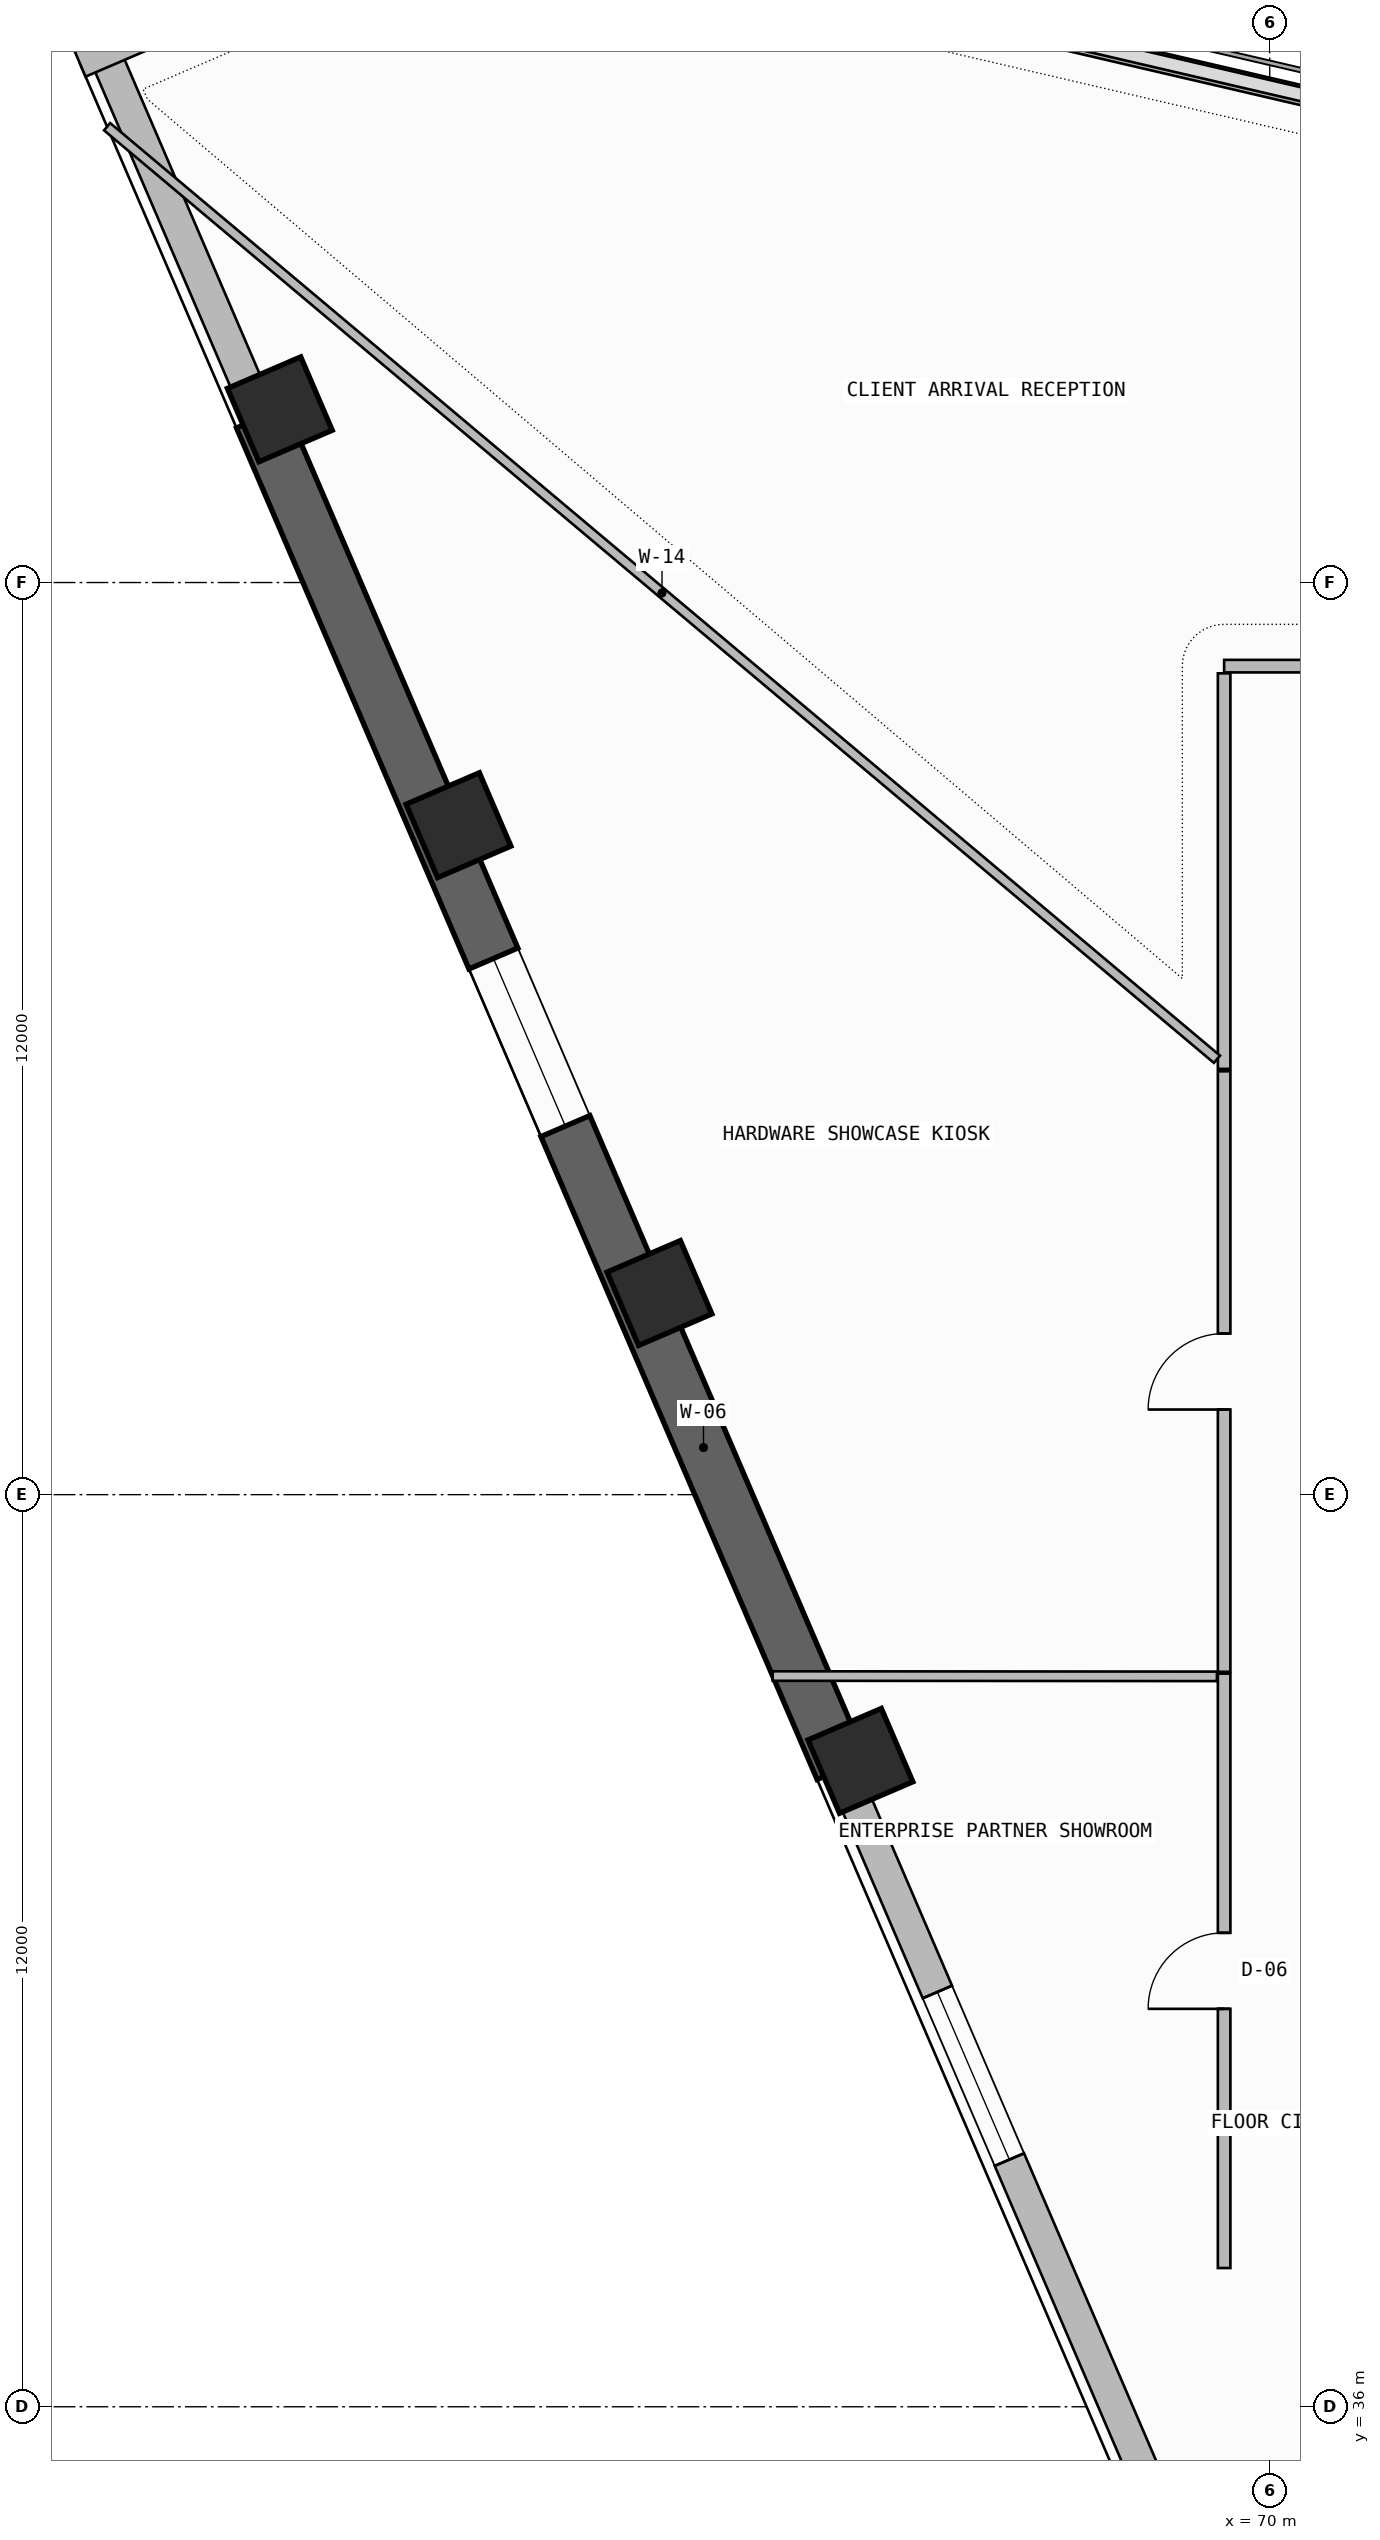
"""IFC4 building model, lengths in metres.
Left out: names, types, materials, properties, quantities, classifications, styles, units other than length and angle.
Written with IfcOpenShell. Run it as: python <this file> out.ifc"""

import sys

from ifc_helpers import new_model, si_unit, direction, frame, frame_2d, origin, origin_2d, place, context, subcontext, project, spatial, rectangle, extrude, element, fill, save


model = new_model("IFC4")
c1 = context("Model", 3, precision=1e-05, world=origin(), true_north=direction((0.0, 1.0)))
c2 = subcontext(c1, "Body", "Model", "MODEL_VIEW")
j1 = project(units=[si_unit("LENGTHUNIT", "METRE"), si_unit("PLANEANGLEUNIT", "RADIAN")], contexts=[c1])
p1 = place(None, origin())
s1 = spatial("IfcSite", under=j1, at=p1, CompositionType="ELEMENT")
p2 = place(p1, origin())
s2 = spatial("IfcBuilding", under=s1, at=p2, CompositionType="ELEMENT")
p3 = place(p2, frame((0.0, 0.0, 182.62)))
s3 = spatial("IfcBuildingStorey", under=s2, at=p3, CompositionType="ELEMENT", Elevation=182.62)
for number, where, z_axis, x_axis in (
    (1, (56.976, 62.279, 0.0), (0.0, 0.0, 1.0), (-0.395, 0.919, 0.0)),
    (2, (59.326, 56.807, 0.0), (0.0, 0.0, 1.0), (-0.395, 0.919, 0.0)),
    (3, (61.97, 50.653, 0.0), (0.0, 0.0, 1.0), (-0.395, 0.919, 0.0)),
    (4, (64.615, 44.498, 0.0), (0.0, 0.0, 1.0), (-0.395, 0.919, 0.0)),
):
    element("IfcColumn", number, at=place(p3, frame(where, z_axis=z_axis, x_axis=x_axis)), inside=s3, PredefinedType="COLUMN", context=c2, shape_type="SweptSolid", body=[
        extrude(rectangle(XDim=1.05, YDim=1.05, at=origin_2d()), origin(), (0.0, 0.0, 1.0), 3.52),
    ])
p4 = place(p3, frame((54.671, 66.959, 0.0), z_axis=(0.0, 0.0, 1.0), x_axis=(0.394733507229, -0.918795656428, 0.0)))
e5 = element("IfcWall", 5, at=p4, inside=s3, PredefinedType="SOLIDWALL", context=c2, shape_type="SweptSolid", body=[
    extrude(rectangle(XDim=5.21, YDim=0.42, at=frame_2d((2.605, 0.0))), origin(), (0.0, 0.0, 1.0), 2.645),
])
p5 = place(p3, frame((56.728, 62.172, -0.26), z_axis=(0.0, 0.0, 1.0), x_axis=(0.394736752992, -0.918794261974, 0.0)))
e6 = element("IfcWall", 6, at=p5, inside=s3, PredefinedType="SHEAR", context=c2, shape_type="SweptSolid", body=[
    extrude(rectangle(XDim=19.353, YDim=0.7, at=frame_2d((9.676, 0.0))), origin(), (0.0, 0.0, 1.0), 3.52),
])
p6 = place(p5, frame((7.747, 0.0, 1.2)))
e7 = element("IfcOpeningElement", 7, at=p6, cuts=e6, PredefinedType="OPENING", context=c2, shape_type="SweptSolid", body=[
    extrude(rectangle(XDim=2.4, YDim=0.9, at=frame_2d((1.2, 0.45))), frame((0.0, 0.36, 0.0), z_axis=(0.0, -1.0, 0.0), x_axis=(1.0, 0.0, 0.0)), (0.0, 0.0, 1.0), 0.72),
])
p7 = place(p3, frame((64.367, 44.391, 0.0), z_axis=(0.0, 0.0, 1.0), x_axis=(0.394757430431, -0.918785378159, 0.0)))
e8 = element("IfcWall", 8, at=p7, inside=s3, PredefinedType="SOLIDWALL", context=c2, shape_type="SweptSolid", body=[
    extrude(rectangle(XDim=12.654, YDim=0.42, at=frame_2d((6.327, 0.0))), origin(), (0.0, 0.0, 1.0), 2.645),
])
p8 = place(p7, frame((3.193, 0.0, 1.2)))
e9 = element("IfcOpeningElement", 9, at=p8, cuts=e8, PredefinedType="OPENING", context=c2, shape_type="SweptSolid", body=[
    extrude(rectangle(XDim=2.4, YDim=0.9, at=frame_2d((1.2, 0.45))), frame((0.0, 0.22, 0.0), z_axis=(0.0, -1.0, 0.0), x_axis=(1.0, 0.0, 0.0)), (0.0, 0.0, 1.0), 0.44),
])
p9 = place(p3, frame((56.566, 67.773, 0.0), z_axis=(0.0, 0.0, 1.0), x_axis=(-0.918788830096, -0.394749396062, 0.0)))
e10 = element("IfcWall", 10, at=p9, inside=s3, PredefinedType="SOLIDWALL", context=c2, shape_type="SweptSolid", body=[
    extrude(rectangle(XDim=2.413, YDim=0.36, at=frame_2d((1.207, 0.0))), origin(), (0.0, 0.0, 1.0), 3.26),
])
p10 = place(p3, frame((87.165, 62.482, 0.0), z_axis=(0.0, 0.0, 1.0), x_axis=(-0.973958631559, 0.226725790352, 0.0)))
e11 = element("IfcWall", 11, at=p10, inside=s3, PredefinedType="PARAPET", context=c2, shape_type="SweptSolid", body=[
    extrude(rectangle(XDim=27.376, YDim=0.2, at=frame_2d((13.688, 0.0))), origin(), (0.0, 0.0, 1.0), 1.15),
])
p11 = place(p3, frame((69.4, 45.646, 0.0), z_axis=(0.0, 0.0, 1.0), x_axis=(0.0, -1.0, 0.0)))
e12 = element("IfcWall", 12, at=p11, inside=s3, PredefinedType="PARTITIONING", context=c2, shape_type="SweptSolid", body=[
    extrude(rectangle(XDim=7.82, YDim=0.165, at=frame_2d((3.91, 0.0))), origin(), (0.0, 0.0, 1.0), 3.26),
])
p12 = place(p11, frame((3.41, 0.0, 0.0)))
e13 = element("IfcOpeningElement", 13, at=p12, cuts=e12, PredefinedType="OPENING", context=c2, shape_type="SweptSolid", body=[
    extrude(rectangle(XDim=1.0, YDim=2.2, at=frame_2d((0.5, 1.1))), frame((0.0, 0.093, 0.0), z_axis=(0.0, -1.0, 0.0), x_axis=(1.0, 0.0, 0.0)), (0.0, 0.0, 1.0), 0.185),
])
p13 = place(p3, frame((63.46, 45.614, 0.0), z_axis=(0.0, 0.0, 1.0), x_axis=(0.999999747894, -0.000710078765, 0.0)))
e14 = element("IfcWall", 14, at=p13, inside=s3, PredefinedType="PARTITIONING", context=c2, shape_type="SweptSolid", body=[
    extrude(rectangle(XDim=5.845, YDim=0.125, at=frame_2d((2.922, 0.0))), origin(), (0.0, 0.0, 1.0), 2.645),
])
p14 = place(p3, frame((76.526, 58.9, 0.0), z_axis=(0.0, 0.0, 1.0), x_axis=(-1.0, 0.0, 0.0)))
e15 = element("IfcWall", 15, at=p14, inside=s3, PredefinedType="PARTITIONING", context=c2, shape_type="SweptSolid", body=[
    extrude(rectangle(XDim=7.126, YDim=0.165, at=frame_2d((3.563, 0.0))), origin(), (0.0, 0.0, 1.0), 2.745),
])
p15 = place(p14, frame((2.204, 0.0, 0.0)))
e16 = element("IfcOpeningElement", 16, at=p15, cuts=e15, PredefinedType="OPENING", context=c2, shape_type="SweptSolid", body=[
    extrude(rectangle(XDim=1.0, YDim=2.2, at=frame_2d((0.5, 1.1))), frame((0.0, 0.093, 0.0), z_axis=(0.0, -1.0, 0.0), x_axis=(1.0, 0.0, 0.0)), (0.0, 0.0, 1.0), 0.185),
])
p16 = place(p3, frame((69.4, 58.805, 0.0), z_axis=(0.0, 0.0, 1.0), x_axis=(0.0, -1.0, 0.0)))
e17 = element("IfcWall", 17, at=p16, inside=s3, PredefinedType="PARTITIONING", context=c2, shape_type="SweptSolid", body=[
    extrude(rectangle(XDim=5.204, YDim=0.165, at=frame_2d((2.602, 0.0))), origin(), (0.0, 0.0, 1.0), 2.745),
])
p17 = place(p3, frame((69.305, 53.728, 0.0), z_axis=(0.0, 0.0, 1.0), x_axis=(-0.765630720535, 0.643280343065, 0.0)))
e18 = element("IfcWall", 18, at=p17, inside=s3, PredefinedType="PARTITIONING", context=c2, shape_type="SweptSolid", body=[
    extrude(rectangle(XDim=19.072, YDim=0.125, at=frame_2d((9.536, 0.0))), origin(), (0.0, 0.0, 1.0), 2.645),
])
p18 = place(p3, frame((69.4, 53.57, 0.0), z_axis=(0.0, 0.0, 1.0), x_axis=(0.0, -1.0, 0.0)))
e19 = element("IfcWall", 19, at=p18, inside=s3, PredefinedType="PARTITIONING", context=c2, shape_type="SweptSolid", body=[
    extrude(rectangle(XDim=7.901, YDim=0.165, at=frame_2d((3.95, 0.0))), origin(), (0.0, 0.0, 1.0), 2.745),
])
p19 = place(p18, frame((3.45, 0.0, 0.0)))
e20 = element("IfcOpeningElement", 20, at=p19, cuts=e19, PredefinedType="OPENING", context=c2, shape_type="SweptSolid", body=[
    extrude(rectangle(XDim=1.0, YDim=2.2, at=frame_2d((0.5, 1.1))), frame((0.0, 0.093, 0.0), z_axis=(0.0, -1.0, 0.0), x_axis=(1.0, 0.0, 0.0)), (0.0, 0.0, 1.0), 0.185),
])
p20 = place(p6, origin())
e21 = element("IfcWindow", 21, at=p20, inside=s3, PartitioningType="SINGLE_PANEL", PredefinedType="WINDOW", context=c2, shape_type="SweptSolid", body=[
    extrude(rectangle(XDim=2.4, YDim=0.9, at=frame_2d((1.2, 0.45))), frame((0.0, 0.03, 0.0), z_axis=(0.0, -1.0, 0.0), x_axis=(1.0, 0.0, 0.0)), (0.0, 0.0, 1.0), 0.06),
])
fill(e7, e21)
p21 = place(p8, origin())
e22 = element("IfcWindow", 22, at=p21, inside=s3, PartitioningType="SINGLE_PANEL", PredefinedType="WINDOW", context=c2, shape_type="SweptSolid", body=[
    extrude(rectangle(XDim=2.4, YDim=0.9, at=frame_2d((1.2, 0.45))), frame((0.0, 0.03, 0.0), z_axis=(0.0, -1.0, 0.0), x_axis=(1.0, 0.0, 0.0)), (0.0, 0.0, 1.0), 0.06),
])
fill(e9, e22)
p22 = place(p12, frame((1.0, 0.0, 0.0), z_axis=(0.0, 0.0, 1.0), x_axis=(-1.0, 0.0, 0.0)))
e23 = element("IfcDoor", 23, at=p22, inside=s3, OperationType="SINGLE_SWING_LEFT", PredefinedType="DOOR", context=c2, shape_type="SweptSolid", body=[
    extrude(rectangle(XDim=1.0, YDim=2.2, at=frame_2d((0.5, 1.1))), frame((0.0, 0.025, 0.0), z_axis=(0.0, -1.0, 0.0), x_axis=(1.0, 0.0, 0.0)), (0.0, 0.0, 1.0), 0.05),
])
fill(e13, e23)
p23 = place(p19, frame((1.0, 0.0, 0.0), z_axis=(0.0, 0.0, 1.0), x_axis=(-1.0, 0.0, 0.0)))
e24 = element("IfcDoor", 24, at=p23, inside=s3, OperationType="SINGLE_SWING_LEFT", PredefinedType="DOOR", context=c2, shape_type="SweptSolid", body=[
    extrude(rectangle(XDim=1.0, YDim=2.2, at=frame_2d((0.5, 1.1))), frame((0.0, 0.025, 0.0), z_axis=(0.0, -1.0, 0.0), x_axis=(1.0, 0.0, 0.0)), (0.0, 0.0, 1.0), 0.05),
])
fill(e20, e24)
save(model, sys.argv[1])
